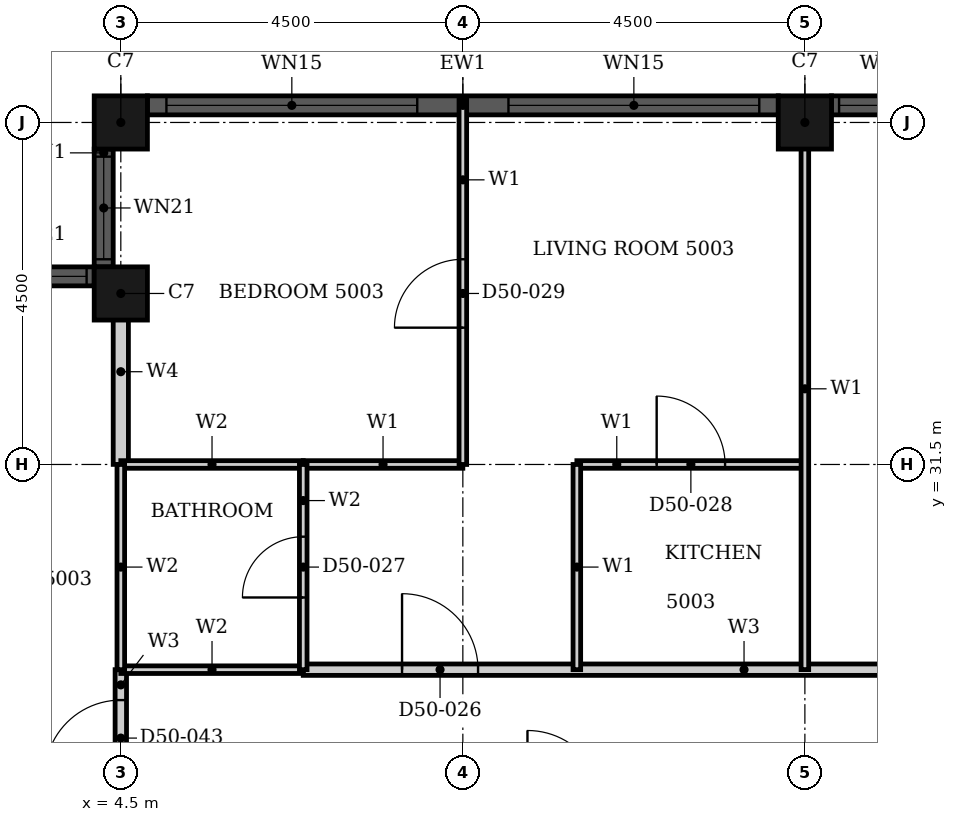
"""IFC4 building model, lengths in metres.
Left out: names, types, materials, properties, quantities, classifications, styles, units other than length and angle.
Written with IfcOpenShell. Run it as: python <this file> out.ifc"""

import sys

from ifc_helpers import new_model, si_unit, direction, frame, frame_2d, origin, origin_2d, place, context, subcontext, project, spatial, rectangle, hollow_rectangle, extrude, element, fill, save


model = new_model("IFC4")
c1 = context("Model", 3, precision=1e-05, world=origin(), true_north=direction((0.0, 1.0)))
c2 = subcontext(c1, "Body", "Model", "MODEL_VIEW")
j1 = project(units=[si_unit("LENGTHUNIT", "METRE"), si_unit("PLANEANGLEUNIT", "RADIAN")], contexts=[c1])
p1 = place(None, origin())
s1 = spatial("IfcSite", under=j1, at=p1, CompositionType="ELEMENT")
p2 = place(p1, origin())
s2 = spatial("IfcBuilding", under=s1, at=p2, CompositionType="ELEMENT")
p3 = place(p2, frame((0.0, 0.0, 199.8)))
s3 = spatial("IfcBuildingStorey", under=s2, at=p3, CompositionType="ELEMENT", Elevation=199.8)
for number, where, z_axis, x_axis in (
    (1, (13.5, 36.0, 0.0), (0.0, 0.0, 1.0), (1.0, 0.0, 0.0)),
    (2, (4.5, 36.0, 0.0), (0.0, 0.0, 1.0), (1.0, 0.0, 0.0)),
    (3, (4.5, 33.75, 0.0), (0.0, 0.0, 1.0), (1.0, 0.0, 0.0)),
):
    element("IfcColumn", number, at=place(p3, frame(where, z_axis=z_axis, x_axis=x_axis)), inside=s3, PredefinedType="COLUMN", context=c2, shape_type="SweptSolid", body=[
        extrude(hollow_rectangle(XDim=0.7, YDim=0.7, WallThickness=0.022, at=origin_2d()), origin(), (0.0, 0.0, 1.0), 3.7),
    ])
p4 = place(p3, frame((15.4, 36.225, 0.0), z_axis=(0.0, 0.0, 1.0), x_axis=(-1.0, 0.0, 0.0)))
e4 = element("IfcWall", 4, at=p4, inside=s3, PredefinedType="SOLIDWALL", context=c2, shape_type="SweptSolid", body=[
    extrude(rectangle(XDim=1.55, YDim=0.25, at=frame_2d((0.775, 0.0))), origin(), (0.0, 0.0, 1.0), 3.7),
])
p5 = place(p4, frame((0.1, 0.0, 0.9)))
e5 = element("IfcOpeningElement", 5, at=p5, cuts=e4, PredefinedType="OPENING", context=c2, shape_type="SweptSolid", body=[
    extrude(rectangle(XDim=1.35, YDim=1.85, at=frame_2d((0.675, 0.925))), frame((0.0, 0.135, 0.0), z_axis=(0.0, -1.0, 0.0), x_axis=(1.0, 0.0, 0.0)), (0.0, 0.0, 1.0), 0.27),
])
p6 = place(p3, frame((13.15, 36.225, 0.0), z_axis=(0.0, 0.0, 1.0), x_axis=(-1.0, 0.0, 0.0)))
e6 = element("IfcWall", 6, at=p6, inside=s3, PredefinedType="SOLIDWALL", context=c2, shape_type="SweptSolid", body=[
    extrude(rectangle(XDim=8.3, YDim=0.25, at=frame_2d((4.15, 0.0))), origin(), (0.0, 0.0, 1.0), 3.7),
])
p7 = place(p6, frame((0.25, 0.0, 0.45)))
e7 = element("IfcOpeningElement", 7, at=p7, cuts=e6, PredefinedType="OPENING", context=c2, shape_type="SweptSolid", body=[
    extrude(rectangle(XDim=3.3, YDim=2.3, at=frame_2d((1.65, 1.15))), frame((0.0, 0.135, 0.0), z_axis=(0.0, -1.0, 0.0), x_axis=(1.0, 0.0, 0.0)), (0.0, 0.0, 1.0), 0.27),
])
p8 = place(p6, frame((4.75, 0.0, 0.45)))
e8 = element("IfcOpeningElement", 8, at=p8, cuts=e6, PredefinedType="OPENING", context=c2, shape_type="SweptSolid", body=[
    extrude(rectangle(XDim=3.3, YDim=2.3, at=frame_2d((1.65, 1.15))), frame((0.0, 0.135, 0.0), z_axis=(0.0, -1.0, 0.0), x_axis=(1.0, 0.0, 0.0)), (0.0, 0.0, 1.0), 0.27),
])
p9 = place(p3, frame((4.275, 35.65, 0.0), z_axis=(0.0, 0.0, 1.0), x_axis=(0.0, -1.0, 0.0)))
e9 = element("IfcWall", 9, at=p9, inside=s3, PredefinedType="SOLIDWALL", context=c2, shape_type="SweptSolid", body=[
    extrude(rectangle(XDim=1.55, YDim=0.25, at=frame_2d((0.775, 0.0))), origin(), (0.0, 0.0, 1.0), 3.7),
])
p10 = place(p9, frame((0.1, 0.0, 0.9)))
e10 = element("IfcOpeningElement", 10, at=p10, cuts=e9, PredefinedType="OPENING", context=c2, shape_type="SweptSolid", body=[
    extrude(rectangle(XDim=1.35, YDim=1.85, at=frame_2d((0.675, 0.925))), frame((0.0, 0.135, 0.0), z_axis=(0.0, -1.0, 0.0), x_axis=(1.0, 0.0, 0.0)), (0.0, 0.0, 1.0), 0.27),
])
p11 = place(p3, frame((4.15, 33.975, 0.0), z_axis=(0.0, 0.0, 1.0), x_axis=(-1.0, 0.0, 0.0)))
e11 = element("IfcWall", 11, at=p11, inside=s3, PredefinedType="SOLIDWALL", context=c2, shape_type="SweptSolid", body=[
    extrude(rectangle(XDim=1.55, YDim=0.25, at=frame_2d((0.775, 0.0))), origin(), (0.0, 0.0, 1.0), 3.7),
])
p12 = place(p11, frame((0.1, 0.0, 0.9)))
e12 = element("IfcOpeningElement", 12, at=p12, cuts=e11, PredefinedType="OPENING", context=c2, shape_type="SweptSolid", body=[
    extrude(rectangle(XDim=1.35, YDim=1.85, at=frame_2d((0.675, 0.925))), frame((0.0, 0.135, 0.0), z_axis=(0.0, -1.0, 0.0), x_axis=(1.0, 0.0, 0.0)), (0.0, 0.0, 1.0), 0.27),
])
p13 = place(p3, frame((6.9, 28.8, 0.0), z_axis=(0.0, 0.0, 1.0), x_axis=(1.0, 0.0, 0.0)))
e13 = element("IfcWall", 13, at=p13, inside=s3, PredefinedType="PARTITIONING", context=c2, shape_type="SweptSolid", body=[
    extrude(rectangle(XDim=9.299, YDim=0.15, at=frame_2d((4.649, 0.0))), origin(), (0.0, 0.0, 1.0), 3.4),
])
p14 = place(p13, frame((1.3, 0.0, 0.0)))
e14 = element("IfcOpeningElement", 14, at=p14, cuts=e13, PredefinedType="OPENING", context=c2, shape_type="SweptSolid", body=[
    extrude(rectangle(XDim=1.0, YDim=2.2, at=frame_2d((0.5, 1.1))), frame((0.0, 0.085, 0.0), z_axis=(0.0, -1.0, 0.0), x_axis=(1.0, 0.0, 0.0)), (0.0, 0.0, 1.0), 0.17),
])
p15 = place(p3, frame((4.5, 27.0, 0.0), z_axis=(0.0, 0.0, 1.0), x_axis=(0.0, 1.0, 0.0)))
e15 = element("IfcWall", 15, at=p15, inside=s3, PredefinedType="PARTITIONING", context=c2, shape_type="SweptSolid", body=[
    extrude(rectangle(XDim=1.8, YDim=0.15, at=frame_2d((0.9, 0.0))), origin(), (0.0, 0.0, 1.0), 3.4),
])
p16 = place(p15, frame((0.4, 0.0, 0.0)))
e16 = element("IfcOpeningElement", 16, at=p16, cuts=e15, PredefinedType="OPENING", context=c2, shape_type="SweptSolid", body=[
    extrude(rectangle(XDim=1.0, YDim=2.2, at=frame_2d((0.5, 1.1))), frame((0.0, 0.085, 0.0), z_axis=(0.0, -1.0, 0.0), x_axis=(1.0, 0.0, 0.0)), (0.0, 0.0, 1.0), 0.17),
])
p17 = place(p3, frame((6.9, 31.5, 0.0), z_axis=(0.0, 0.0, 1.0), x_axis=(1.0, 0.0, 0.0)))
e17 = element("IfcWall", 17, at=p17, inside=s3, PredefinedType="PARTITIONING", context=c2, shape_type="SweptSolid", body=[
    extrude(rectangle(XDim=2.1, YDim=0.1, at=frame_2d((1.05, 0.0))), origin(), (0.0, 0.0, 1.0), 2.68),
])
p18 = place(p3, frame((10.5, 31.5, 0.0), z_axis=(0.0, 0.0, 1.0), x_axis=(1.0, 0.0, 0.0)))
e18 = element("IfcWall", 18, at=p18, inside=s3, PredefinedType="PARTITIONING", context=c2, shape_type="SweptSolid", body=[
    extrude(rectangle(XDim=3.0, YDim=0.1, at=frame_2d((1.5, 0.0))), origin(), (0.0, 0.0, 1.0), 2.68),
])
p19 = place(p18, frame((1.05, 0.0, 0.0)))
e19 = element("IfcOpeningElement", 19, at=p19, cuts=e18, PredefinedType="OPENING", context=c2, shape_type="SweptSolid", body=[
    extrude(rectangle(XDim=0.9, YDim=2.1, at=frame_2d((0.45, 1.05))), frame((0.0, 0.06, 0.0), z_axis=(0.0, -1.0, 0.0), x_axis=(1.0, 0.0, 0.0)), (0.0, 0.0, 1.0), 0.12),
])
p20 = place(p3, frame((10.5, 28.8, 0.0), z_axis=(0.0, 0.0, 1.0), x_axis=(0.0, 1.0, 0.0)))
e20 = element("IfcWall", 20, at=p20, inside=s3, PredefinedType="PARTITIONING", context=c2, shape_type="SweptSolid", body=[
    extrude(rectangle(XDim=2.7, YDim=0.1, at=frame_2d((1.35, 0.0))), origin(), (0.0, 0.0, 1.0), 3.4),
])
p21 = place(p3, frame((13.5, 28.801, 0.0), z_axis=(0.0, 0.0, 1.0), x_axis=(0.0, 1.0, 0.0)))
e21 = element("IfcWall", 21, at=p21, inside=s3, PredefinedType="PARTITIONING", context=c2, shape_type="SweptSolid", body=[
    extrude(rectangle(XDim=7.389, YDim=0.1, at=frame_2d((3.694, 0.0))), origin(), (0.0, 0.0, 1.0), 2.48),
])
p22 = place(p3, frame((9.0, 31.5, 0.0), z_axis=(0.0, 0.0, 1.0), x_axis=(0.0, 1.0, 0.0)))
e22 = element("IfcWall", 22, at=p22, inside=s3, PredefinedType="PARTITIONING", context=c2, shape_type="SweptSolid", body=[
    extrude(rectangle(XDim=4.79, YDim=0.1, at=frame_2d((2.395, 0.0))), origin(), (0.0, 0.0, 1.0), 3.4),
])
p23 = place(p22, frame((1.8, 0.0, 0.0)))
e23 = element("IfcOpeningElement", 23, at=p23, cuts=e22, PredefinedType="OPENING", context=c2, shape_type="SweptSolid", body=[
    extrude(rectangle(XDim=0.9, YDim=2.1, at=frame_2d((0.45, 1.05))), frame((0.0, 0.06, 0.0), z_axis=(0.0, -1.0, 0.0), x_axis=(1.0, 0.0, 0.0)), (0.0, 0.0, 1.0), 0.12),
])
p24 = place(p3, frame((4.5, 31.501, 0.0), z_axis=(0.0, 0.0, 1.0), x_axis=(0.0, 1.0, 0.0)))
e24 = element("IfcWall", 24, at=p24, inside=s3, PredefinedType="PARTITIONING", context=c2, shape_type="SweptSolid", body=[
    extrude(rectangle(XDim=2.439, YDim=0.2, at=frame_2d((1.219, 0.0))), origin(), (0.0, 0.0, 1.0), 3.4),
])
p25 = place(p3, frame((4.5, 28.8, 0.0), z_axis=(0.0, 0.0, 1.0), x_axis=(1.0, 0.0, 0.0)))
e25 = element("IfcWall", 25, at=p25, inside=s3, PredefinedType="PARTITIONING", context=c2, shape_type="SweptSolid", body=[
    extrude(rectangle(XDim=2.4, YDim=0.1, at=frame_2d((1.2, 0.0))), origin(), (0.0, 0.0, 1.0), 3.4),
])
p26 = place(p3, frame((4.5, 31.5, 0.0), z_axis=(0.0, 0.0, 1.0), x_axis=(1.0, 0.0, 0.0)))
e26 = element("IfcWall", 26, at=p26, inside=s3, PredefinedType="PARTITIONING", context=c2, shape_type="SweptSolid", body=[
    extrude(rectangle(XDim=2.4, YDim=0.1, at=frame_2d((1.2, 0.0))), origin(), (0.0, 0.0, 1.0), 2.68),
])
p27 = place(p3, frame((4.5, 28.8, 0.0), z_axis=(0.0, 0.0, 1.0), x_axis=(0.0, 1.0, 0.0)))
e27 = element("IfcWall", 27, at=p27, inside=s3, PredefinedType="PARTITIONING", context=c2, shape_type="SweptSolid", body=[
    extrude(rectangle(XDim=2.7, YDim=0.1, at=frame_2d((1.35, 0.0))), origin(), (0.0, 0.0, 1.0), 3.4),
])
p28 = place(p3, frame((6.9, 28.8, 0.0), z_axis=(0.0, 0.0, 1.0), x_axis=(0.0, 1.0, 0.0)))
e28 = element("IfcWall", 28, at=p28, inside=s3, PredefinedType="PARTITIONING", context=c2, shape_type="SweptSolid", body=[
    extrude(rectangle(XDim=2.7, YDim=0.1, at=frame_2d((1.35, 0.0))), origin(), (0.0, 0.0, 1.0), 3.4),
])
p29 = place(p28, frame((0.95, 0.0, 0.0)))
e29 = element("IfcOpeningElement", 29, at=p29, cuts=e28, PredefinedType="OPENING", context=c2, shape_type="SweptSolid", body=[
    extrude(rectangle(XDim=0.8, YDim=2.1, at=frame_2d((0.4, 1.05))), frame((0.0, 0.06, 0.0), z_axis=(0.0, -1.0, 0.0), x_axis=(1.0, 0.0, 0.0)), (0.0, 0.0, 1.0), 0.12),
])
p30 = place(p5, origin())
e30 = element("IfcWindow", 30, at=p30, inside=s3, PartitioningType="SINGLE_PANEL", PredefinedType="WINDOW", context=c2, shape_type="SweptSolid", body=[
    extrude(rectangle(XDim=1.35, YDim=1.85, at=frame_2d((0.675, 0.925))), frame((0.0, 0.03, 0.0), z_axis=(0.0, -1.0, 0.0), x_axis=(1.0, 0.0, 0.0)), (0.0, 0.0, 1.0), 0.06),
])
fill(e5, e30)
p31 = place(p7, origin())
e31 = element("IfcWindow", 31, at=p31, inside=s3, PartitioningType="SINGLE_PANEL", PredefinedType="WINDOW", context=c2, shape_type="SweptSolid", body=[
    extrude(rectangle(XDim=3.3, YDim=2.3, at=frame_2d((1.65, 1.15))), frame((0.0, 0.03, 0.0), z_axis=(0.0, -1.0, 0.0), x_axis=(1.0, 0.0, 0.0)), (0.0, 0.0, 1.0), 0.06),
])
fill(e7, e31)
p32 = place(p8, origin())
e32 = element("IfcWindow", 32, at=p32, inside=s3, PartitioningType="SINGLE_PANEL", PredefinedType="WINDOW", context=c2, shape_type="SweptSolid", body=[
    extrude(rectangle(XDim=3.3, YDim=2.3, at=frame_2d((1.65, 1.15))), frame((0.0, 0.03, 0.0), z_axis=(0.0, -1.0, 0.0), x_axis=(1.0, 0.0, 0.0)), (0.0, 0.0, 1.0), 0.06),
])
fill(e8, e32)
p33 = place(p10, origin())
e33 = element("IfcWindow", 33, at=p33, inside=s3, PartitioningType="SINGLE_PANEL", PredefinedType="WINDOW", context=c2, shape_type="SweptSolid", body=[
    extrude(rectangle(XDim=1.35, YDim=1.85, at=frame_2d((0.675, 0.925))), frame((0.0, 0.03, 0.0), z_axis=(0.0, -1.0, 0.0), x_axis=(1.0, 0.0, 0.0)), (0.0, 0.0, 1.0), 0.06),
])
fill(e10, e33)
p34 = place(p12, origin())
e34 = element("IfcWindow", 34, at=p34, inside=s3, PartitioningType="SINGLE_PANEL", PredefinedType="WINDOW", context=c2, shape_type="SweptSolid", body=[
    extrude(rectangle(XDim=1.35, YDim=1.85, at=frame_2d((0.675, 0.925))), frame((0.0, 0.03, 0.0), z_axis=(0.0, -1.0, 0.0), x_axis=(1.0, 0.0, 0.0)), (0.0, 0.0, 1.0), 0.06),
])
fill(e12, e34)
p35 = place(p14, origin())
e35 = element("IfcDoor", 35, at=p35, inside=s3, OperationType="SINGLE_SWING_RIGHT", PredefinedType="DOOR", context=c2, shape_type="SweptSolid", body=[
    extrude(rectangle(XDim=1.0, YDim=2.2, at=frame_2d((0.5, 1.1))), frame((0.0, 0.025, 0.0), z_axis=(0.0, -1.0, 0.0), x_axis=(1.0, 0.0, 0.0)), (0.0, 0.0, 1.0), 0.05),
])
fill(e14, e35)
p36 = place(p29, origin())
e36 = element("IfcDoor", 36, at=p36, inside=s3, OperationType="SINGLE_SWING_RIGHT", PredefinedType="DOOR", context=c2, shape_type="SweptSolid", body=[
    extrude(rectangle(XDim=0.8, YDim=2.1, at=frame_2d((0.4, 1.05))), frame((0.0, 0.025, 0.0), z_axis=(0.0, -1.0, 0.0), x_axis=(1.0, 0.0, 0.0)), (0.0, 0.0, 1.0), 0.05),
])
fill(e29, e36)
p37 = place(p19, origin())
e37 = element("IfcDoor", 37, at=p37, inside=s3, OperationType="SINGLE_SWING_LEFT", PredefinedType="DOOR", context=c2, shape_type="SweptSolid", body=[
    extrude(rectangle(XDim=0.9, YDim=2.1, at=frame_2d((0.45, 1.05))), frame((0.0, 0.025, 0.0), z_axis=(0.0, -1.0, 0.0), x_axis=(1.0, 0.0, 0.0)), (0.0, 0.0, 1.0), 0.05),
])
fill(e19, e37)
p38 = place(p23, origin())
e38 = element("IfcDoor", 38, at=p38, inside=s3, OperationType="SINGLE_SWING_LEFT", PredefinedType="DOOR", context=c2, shape_type="SweptSolid", body=[
    extrude(rectangle(XDim=0.9, YDim=2.1, at=frame_2d((0.45, 1.05))), frame((0.0, 0.025, 0.0), z_axis=(0.0, -1.0, 0.0), x_axis=(1.0, 0.0, 0.0)), (0.0, 0.0, 1.0), 0.05),
])
fill(e23, e38)
p39 = place(p16, origin())
e39 = element("IfcDoor", 39, at=p39, inside=s3, OperationType="SINGLE_SWING_LEFT", PredefinedType="DOOR", context=c2, shape_type="SweptSolid", body=[
    extrude(rectangle(XDim=1.0, YDim=2.2, at=frame_2d((0.5, 1.1))), frame((0.0, 0.025, 0.0), z_axis=(0.0, -1.0, 0.0), x_axis=(1.0, 0.0, 0.0)), (0.0, 0.0, 1.0), 0.05),
])
fill(e16, e39)
save(model, sys.argv[1])
